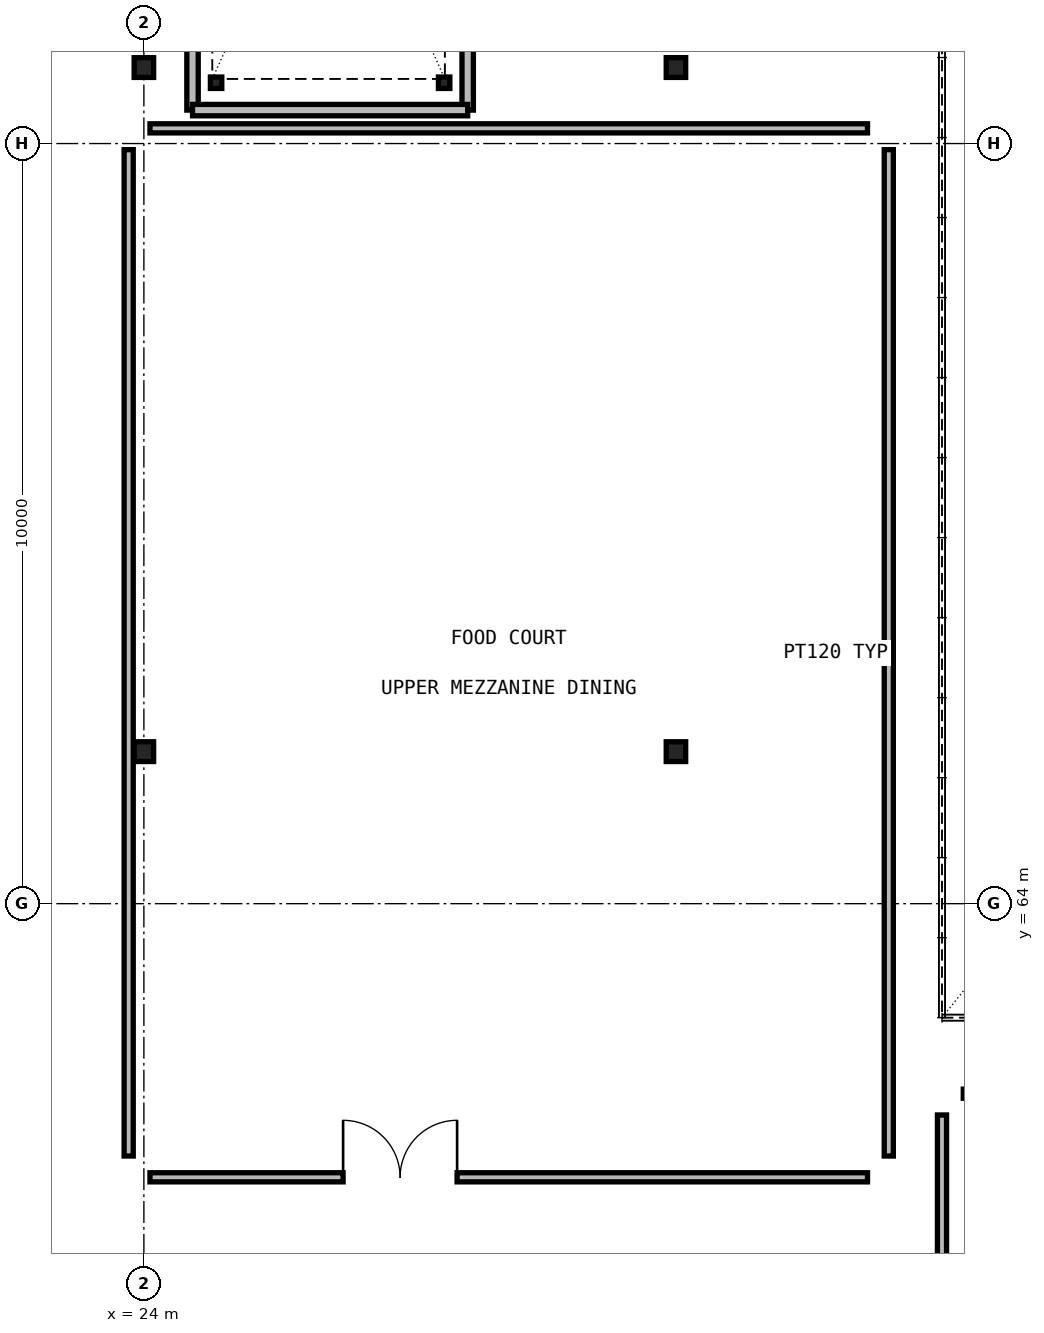
"""IFC4 building model, lengths in metres.
Left out: names, types, materials, properties, quantities, classifications, styles, units other than length and angle.
Written with IfcOpenShell. Run it as: python <this file> out.ifc"""

import sys

from ifc_helpers import new_model, si_unit, direction, frame, frame_2d, origin, origin_2d_with_axis, place, context, subcontext, project, spatial, rectangle, hollow_rectangle, i_section, extrude, element, fill, save


model = new_model("IFC4")
c1 = context("Model", 3, precision=1e-05, world=origin(), true_north=direction((0.0, 1.0)))
c2 = subcontext(c1, "Body", "Model", "MODEL_VIEW")
j1 = project(units=[si_unit("LENGTHUNIT", "METRE"), si_unit("PLANEANGLEUNIT", "RADIAN")], contexts=[c1])
p1 = place(None, origin())
s1 = spatial("IfcSite", under=j1, at=p1, CompositionType="ELEMENT")
p2 = place(p1, origin())
s2 = spatial("IfcBuilding", under=s1, at=p2, CompositionType="ELEMENT")
p3 = place(p2, frame((0.0, 0.0, 4.5)))
s3 = spatial("IfcBuildingStorey", under=s2, at=p3, CompositionType="ELEMENT", Elevation=4.5)
for number, where, z_axis, x_axis in (
    (1, (24.0, 66.0, 0.0), (0.0, 0.0, 1.0), (1.0, 0.0, 0.0)),
    (2, (24.0, 75.0, 0.0), (0.0, 0.0, 1.0), (1.0, 0.0, 0.0)),
    (3, (31.0, 66.0, 0.0), (0.0, 0.0, 1.0), (1.0, 0.0, 0.0)),
    (4, (31.0, 75.0, 0.0), (0.0, 0.0, 1.0), (1.0, 0.0, 0.0)),
):
    element("IfcColumn", number, at=place(p3, frame(where, z_axis=z_axis, x_axis=x_axis)), inside=s3, PredefinedType="COLUMN", context=c2, shape_type="SweptSolid", body=[
        extrude(i_section(OverallWidth=0.256, OverallDepth=0.26, WebThickness=0.01, FlangeThickness=0.017, FilletRadius=0.014, at=origin_2d_with_axis()), origin(), (0.0, 0.0, 1.0), 3.9),
    ])
for number, where, z_axis, x_axis in (
    (5, (24.95, 74.8, 0.0), (0.0, 0.0, 1.0), (1.0, 0.0, 0.0)),
    (6, (27.95, 74.8, 0.0), (0.0, 0.0, 1.0), (1.0, 0.0, 0.0)),
):
    element("IfcColumn", number, at=place(p3, frame(where, z_axis=z_axis, x_axis=x_axis)), inside=s3, PredefinedType="COLUMN", context=c2, shape_type="SweptSolid", body=[
        extrude(hollow_rectangle(XDim=0.15, YDim=0.15, WallThickness=0.006, InnerFilletRadius=0.006, OuterFilletRadius=0.012, at=origin_2d_with_axis()), origin(), (0.0, 0.0, 1.0), 3.65),
    ])
for number, where, z_axis, x_axis in (
    (7, (24.64, 83.36, 0.0), (0.0, 0.0, 1.0), (0.0, -1.0, 0.0)),
    (8, (28.26, 74.44, 0.0), (0.0, 0.0, 1.0), (0.0, 1.0, 0.0)),
):
    element("IfcWall", number, at=place(p3, frame(where, z_axis=z_axis, x_axis=x_axis)), inside=s3, PredefinedType="PARTITIONING", context=c2, shape_type="SweptSolid", body=[
        extrude(rectangle(XDim=8.92, YDim=0.15, at=frame_2d((4.46, 0.0), x_axis=(1.0, 0.0))), origin(), (0.0, 0.0, 1.0), 3.07),
    ])
p4 = place(p3, frame((24.64, 74.44, 0.0), z_axis=(0.0, 0.0, 1.0), x_axis=(1.0, 0.0, 0.0)))
e9 = element("IfcWall", 9, at=p4, inside=s3, PredefinedType="PARTITIONING", context=c2, shape_type="SweptSolid", body=[
    extrude(rectangle(XDim=3.62, YDim=0.15, at=frame_2d((1.81, 0.0), x_axis=(1.0, 0.0))), origin(), (0.0, 0.0, 1.0), 3.07),
])
p5 = place(p3, frame((24.08, 60.4, 0.0), z_axis=(0.0, 0.0, 1.0), x_axis=(1.0, 0.0, 0.0)))
e10 = element("IfcWall", 10, at=p5, inside=s3, PredefinedType="PARTITIONING", context=c2, shape_type="SweptSolid", body=[
    extrude(rectangle(XDim=9.44, YDim=0.12, at=frame_2d((4.72, 0.0), x_axis=(1.0, 0.0))), origin(), (0.0, 0.0, 1.0), 3.03),
])
p6 = place(p5, frame((2.541, 0.0, 0.0)))
e11 = element("IfcOpeningElement", 11, at=p6, cuts=e10, PredefinedType="OPENING", context=c2, shape_type="SweptSolid", body=[
    extrude(rectangle(XDim=1.5, YDim=2.25, at=frame_2d((0.75, 1.125), x_axis=(1.0, 0.0))), frame((0.0, 0.07, 0.0), z_axis=(0.0, -1.0, 0.0), x_axis=(1.0, 0.0, 0.0)), (0.0, 0.0, 1.0), 0.14),
])
p7 = place(p3, frame((33.8, 60.68, 0.0), z_axis=(0.0, 0.0, 1.0), x_axis=(0.0, 1.0, 0.0)))
e12 = element("IfcWall", 12, at=p7, inside=s3, PredefinedType="PARTITIONING", context=c2, shape_type="SweptSolid", body=[
    extrude(rectangle(XDim=13.24, YDim=0.12, at=frame_2d((6.62, 0.0), x_axis=(1.0, 0.0))), origin(), (0.0, 0.0, 1.0), 3.03),
])
p8 = place(p3, frame((33.52, 74.2, 0.0), z_axis=(0.0, 0.0, 1.0), x_axis=(-1.0, 0.0, 0.0)))
e13 = element("IfcWall", 13, at=p8, inside=s3, PredefinedType="PARTITIONING", context=c2, shape_type="SweptSolid", body=[
    extrude(rectangle(XDim=9.44, YDim=0.12, at=frame_2d((4.72, 0.0), x_axis=(1.0, 0.0))), origin(), (0.0, 0.0, 1.0), 3.03),
])
p9 = place(p3, frame((23.8, 73.92, 0.0), z_axis=(0.0, 0.0, 1.0), x_axis=(0.0, -1.0, 0.0)))
e14 = element("IfcWall", 14, at=p9, inside=s3, PredefinedType="PARTITIONING", context=c2, shape_type="SweptSolid", body=[
    extrude(rectangle(XDim=13.24, YDim=0.12, at=frame_2d((6.62, 0.0), x_axis=(1.0, 0.0))), origin(), (0.0, 0.0, 1.0), 3.03),
])
p10 = place(p3, frame((50.72, 61.5, 0.0), z_axis=(0.0, 0.0, 1.0), x_axis=(-1.0, 0.0, 0.0)))
e15 = element("IfcWall", 15, at=p10, inside=s3, PredefinedType="PARTITIONING", context=c2, shape_type="SweptSolid", body=[
    extrude(rectangle(XDim=15.94, YDim=0.12, at=frame_2d((7.97, 0.0), x_axis=(1.0, 0.0))), origin(), (0.0, 0.0, 1.0), 3.03),
])
p11 = place(p3, frame((34.5, 61.22, 0.0), z_axis=(0.0, 0.0, 1.0), x_axis=(0.0, -1.0, 0.0)))
e16 = element("IfcWall", 16, at=p11, inside=s3, PredefinedType="PARTITIONING", context=c2, shape_type="SweptSolid", body=[
    extrude(rectangle(XDim=12.14, YDim=0.12, at=frame_2d((6.07, 0.0), x_axis=(1.0, 0.0))), origin(), (0.0, 0.0, 1.0), 3.03),
])
p12 = place(p11, frame((8.527, 0.0, 0.0)))
e17 = element("IfcOpeningElement", 17, at=p12, cuts=e16, PredefinedType="OPENING", context=c2, shape_type="SweptSolid", body=[
    extrude(rectangle(XDim=0.92, YDim=2.15, at=frame_2d((0.46, 1.075), x_axis=(1.0, 0.0))), frame((0.0, 0.07, 0.0), z_axis=(0.0, -1.0, 0.0), x_axis=(1.0, 0.0, 0.0)), (0.0, 0.0, 1.0), 0.14),
])
p13 = place(p6, origin())
e18 = element("IfcDoor", 18, at=p13, inside=s3, OperationType="DOUBLE_SWING_LEFT", PredefinedType="DOOR", context=c2, shape_type="SweptSolid", body=[
    extrude(rectangle(XDim=1.5, YDim=2.25, at=frame_2d((0.75, 1.125), x_axis=(1.0, 0.0))), frame((0.0, 0.025, 0.0), z_axis=(0.0, -1.0, 0.0), x_axis=(1.0, 0.0, 0.0)), (0.0, 0.0, 1.0), 0.05),
])
fill(e11, e18)
save(model, sys.argv[1])
